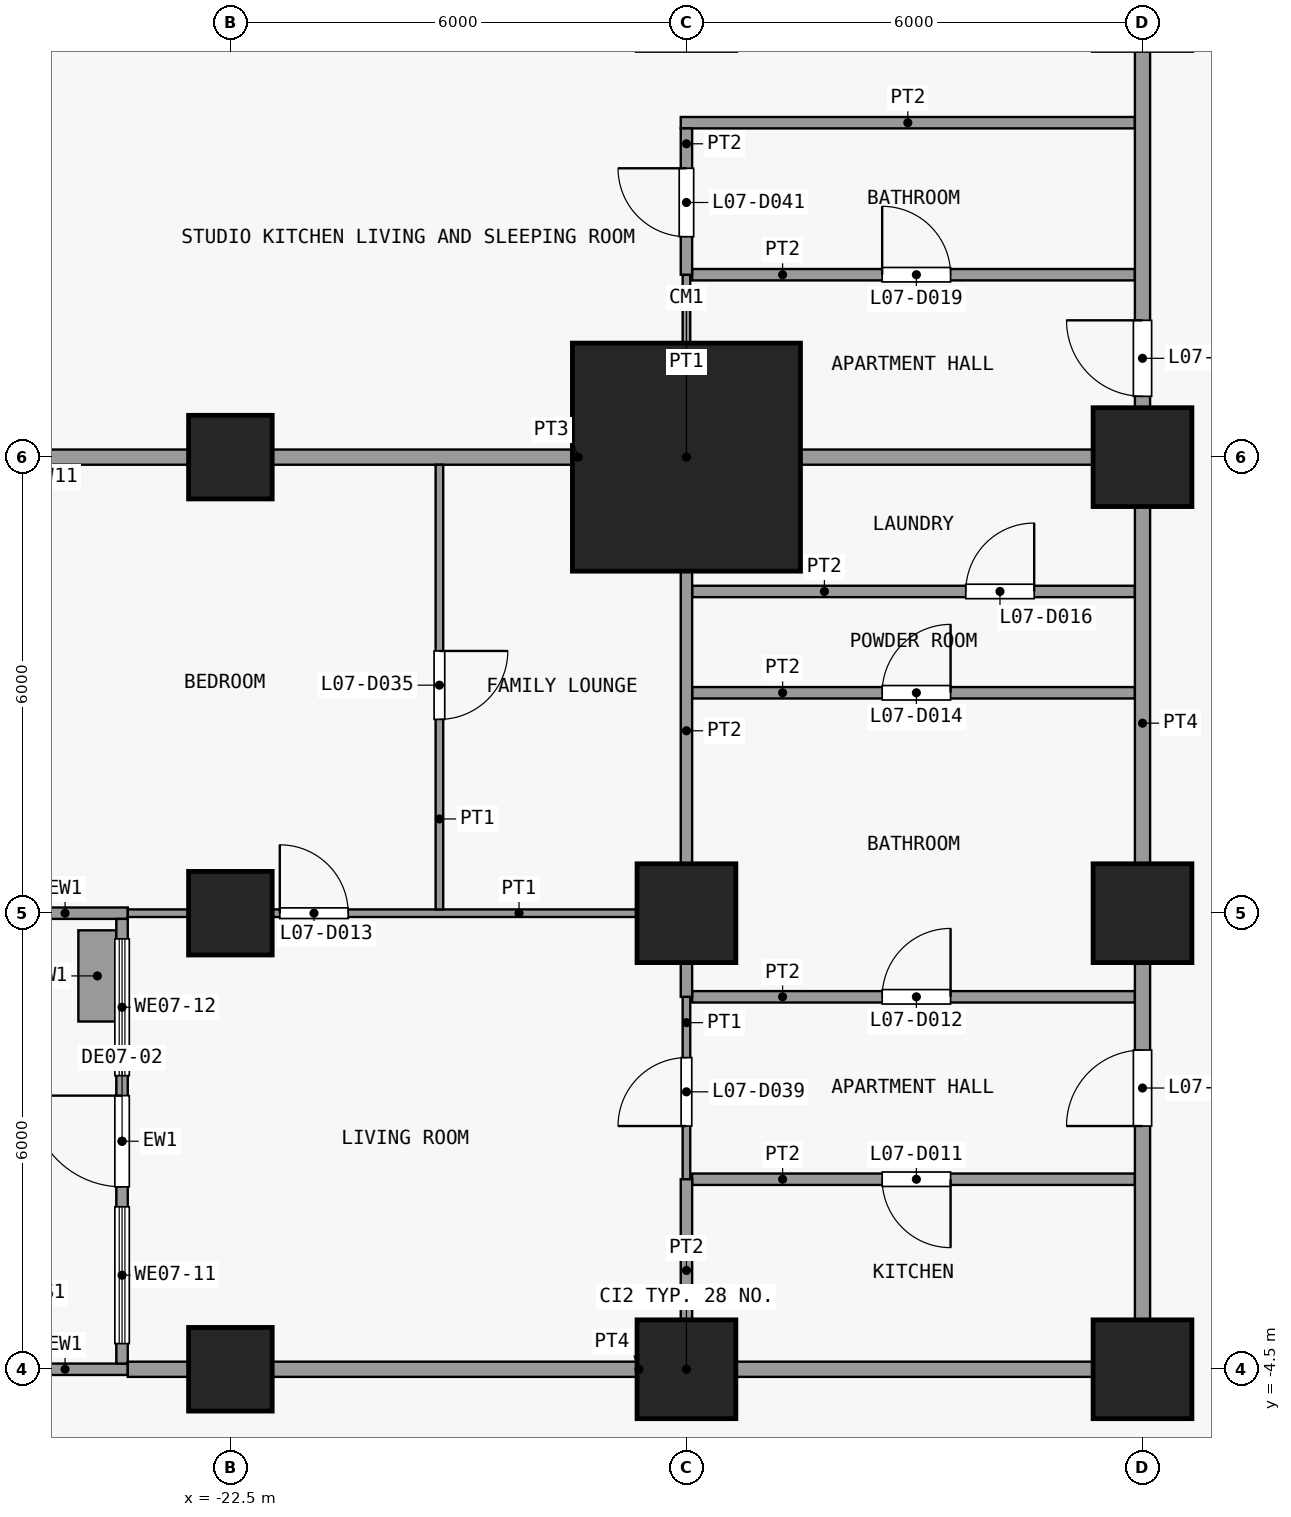
"""IFC4 building model, lengths in metres.
Left out: names, types, materials, properties, quantities, classifications, styles, units other than length and angle.
Written with IfcOpenShell. Run it as: python <this file> out.ifc"""

import sys

from ifc_helpers import new_model, si_unit, direction, frame, frame_2d, origin, origin_2d, place, context, subcontext, project, spatial, rectangle, extrude, element, fill, save


model = new_model("IFC4")
c1 = context("Model", 3, precision=1e-05, world=origin(), true_north=direction((0.0, 1.0)))
c2 = subcontext(c1, "Body", "Model", "MODEL_VIEW")
j1 = project(units=[si_unit("LENGTHUNIT", "METRE"), si_unit("PLANEANGLEUNIT", "RADIAN")], contexts=[c1])
p1 = place(None, origin())
s1 = spatial("IfcSite", under=j1, at=p1, CompositionType="ELEMENT")
p2 = place(p1, origin())
s2 = spatial("IfcBuilding", under=s1, at=p2, CompositionType="ELEMENT")
p3 = place(p2, frame((0.0, 0.0, 36.1)))
s3 = spatial("IfcBuildingStorey", under=s2, at=p3, CompositionType="ELEMENT", Elevation=36.1)
for number, where, z_axis, x_axis in (
    (1, (-22.5, -4.5, 0.0), (0.0, 0.0, 1.0), (1.0, 0.0, 0.0)),
    (2, (-22.5, 1.5, 0.0), (0.0, 0.0, 1.0), (1.0, 0.0, 0.0)),
    (3, (-22.5, 7.5, 0.0), (0.0, 0.0, 1.0), (1.0, 0.0, 0.0)),
):
    element("IfcColumn", number, at=place(p3, frame(where, z_axis=z_axis, x_axis=x_axis)), inside=s3, PredefinedType="COLUMN", context=c2, shape_type="SweptSolid", body=[
        extrude(rectangle(XDim=1.1, YDim=1.1, at=origin_2d()), origin(), (0.0, 0.0, 1.0), 3.6),
    ])
for number, where, z_axis, x_axis in (
    (4, (-16.5, -4.5, 0.0), (0.0, 0.0, 1.0), (1.0, 0.0, 0.0)),
    (5, (-16.5, 1.5, 0.0), (0.0, 0.0, 1.0), (1.0, 0.0, 0.0)),
):
    element("IfcColumn", number, at=place(p3, frame(where, z_axis=z_axis, x_axis=x_axis)), inside=s3, PredefinedType="COLUMN", context=c2, shape_type="SweptSolid", body=[
        extrude(rectangle(XDim=1.3, YDim=1.3, at=origin_2d()), origin(), (0.0, 0.0, 1.0), 3.6),
    ])
p4 = place(p3, frame((-16.5, 7.5, 0.0), z_axis=(0.0, 0.0, 1.0), x_axis=(1.0, 0.0, 0.0)))
e6 = element("IfcColumn", 6, at=p4, inside=s3, PredefinedType="COLUMN", context=c2, shape_type="SweptSolid", body=[
    extrude(rectangle(XDim=3.0, YDim=3.0, at=origin_2d()), origin(), (0.0, 0.0, 1.0), 3.6),
])
for number, where, z_axis, x_axis in (
    (7, (-10.5, -4.5, 0.0), (0.0, 0.0, 1.0), (1.0, 0.0, 0.0)),
    (8, (-10.5, 1.5, 0.0), (0.0, 0.0, 1.0), (1.0, 0.0, 0.0)),
    (9, (-10.5, 7.5, 0.0), (0.0, 0.0, 1.0), (1.0, 0.0, 0.0)),
):
    element("IfcColumn", number, at=place(p3, frame(where, z_axis=z_axis, x_axis=x_axis)), inside=s3, PredefinedType="COLUMN", context=c2, shape_type="SweptSolid", body=[
        extrude(rectangle(XDim=1.3, YDim=1.3, at=origin_2d()), origin(), (0.0, 0.0, 1.0), 3.6),
    ])
for number, where, z_axis, x_axis in (
    (10, (-23.85, -4.5, 0.0), (0.0, 0.0, 1.0), (-1.0, 0.0, 0.0)),
    (11, (-23.85, 1.5, 0.0), (0.0, 0.0, 1.0), (-1.0, 0.0, 0.0)),
):
    element("IfcWall", number, at=place(p3, frame(where, z_axis=z_axis, x_axis=x_axis)), inside=s3, PredefinedType="SOLIDWALL", context=c2, shape_type="SweptSolid", body=[
        extrude(rectangle(XDim=1.65, YDim=0.15, at=frame_2d((0.825, 0.0))), origin(), (0.0, 0.0, 1.0), 3.3),
    ])
p5 = place(p3, frame((-23.925, -4.425, 0.0), z_axis=(0.0, 0.0, 1.0), x_axis=(0.0, 1.0, 0.0)))
e12 = element("IfcWall", 12, at=p5, inside=s3, PredefinedType="SOLIDWALL", context=c2, shape_type="SweptSolid", body=[
    extrude(rectangle(XDim=5.85, YDim=0.15, at=frame_2d((2.925, 0.0))), origin(), (0.0, 0.0, 1.0), 3.3),
])
p6 = place(p5, frame((2.325, 0.0, 0.0)))
e13 = element("IfcOpeningElement", 13, at=p6, cuts=e12, PredefinedType="OPENING", context=c2, shape_type="SweptSolid", body=[
    extrude(rectangle(XDim=1.2, YDim=2.4, at=frame_2d((0.6, 1.2))), frame((0.0, 0.085, 0.0), z_axis=(0.0, -1.0, 0.0), x_axis=(1.0, 0.0, 0.0)), (0.0, 0.0, 1.0), 0.17),
])
p7 = place(p5, frame((0.262, 0.0, 0.9)))
e14 = element("IfcOpeningElement", 14, at=p7, cuts=e12, PredefinedType="OPENING", context=c2, shape_type="SweptSolid", body=[
    extrude(rectangle(XDim=1.8, YDim=2.1, at=frame_2d((0.9, 1.05))), frame((0.0, 0.085, 0.0), z_axis=(0.0, -1.0, 0.0), x_axis=(1.0, 0.0, 0.0)), (0.0, 0.0, 1.0), 0.17),
])
p8 = place(p5, frame((3.788, 0.0, 0.9)))
e15 = element("IfcOpeningElement", 15, at=p8, cuts=e12, PredefinedType="OPENING", context=c2, shape_type="SweptSolid", body=[
    extrude(rectangle(XDim=1.8, YDim=2.1, at=frame_2d((0.9, 1.05))), frame((0.0, 0.085, 0.0), z_axis=(0.0, -1.0, 0.0), x_axis=(1.0, 0.0, 0.0)), (0.0, 0.0, 1.0), 0.17),
])
p9 = place(p3, frame((-24.25, 0.075, 0.0), z_axis=(0.0, 0.0, 1.0), x_axis=(0.0, 1.0, 0.0)))
e16 = element("IfcWall", 16, at=p9, inside=s3, PredefinedType="USERDEFINED", context=c2, shape_type="SweptSolid", body=[
    extrude(rectangle(XDim=1.2, YDim=0.5, at=frame_2d((0.6, 0.0))), origin(), (0.0, 0.0, 1.0), 0.9),
])
p10 = place(p3, frame((-23.85, -4.5, 0.0), z_axis=(0.0, 0.0, 1.0), x_axis=(1.0, 0.0, 0.0)))
e17 = element("IfcWall", 17, at=p10, inside=s3, PredefinedType="PARTITIONING", context=c2, shape_type="SweptSolid", body=[
    extrude(rectangle(XDim=13.45, YDim=0.2, at=frame_2d((6.725, 0.0))), origin(), (0.0, 0.0, 1.0), 3.3),
])
p11 = place(p3, frame((-16.425, -2.0, 0.0), z_axis=(0.0, 0.0, 1.0), x_axis=(1.0, 0.0, 0.0)))
e18 = element("IfcWall", 18, at=p11, inside=s3, PredefinedType="PARTITIONING", context=c2, shape_type="SweptSolid", body=[
    extrude(rectangle(XDim=5.825, YDim=0.15, at=frame_2d((2.913, 0.0))), origin(), (0.0, 0.0, 1.0), 3.3),
])
p12 = place(p11, frame((2.5, 0.0, 0.0)))
e19 = element("IfcOpeningElement", 19, at=p12, cuts=e18, PredefinedType="OPENING", context=c2, shape_type="SweptSolid", body=[
    extrude(rectangle(XDim=0.9, YDim=2.1, at=frame_2d((0.45, 1.05))), frame((0.0, 0.085, 0.0), z_axis=(0.0, -1.0, 0.0), x_axis=(1.0, 0.0, 0.0)), (0.0, 0.0, 1.0), 0.17),
])
p13 = place(p3, frame((-16.425, 0.4, 0.0), z_axis=(0.0, 0.0, 1.0), x_axis=(1.0, 0.0, 0.0)))
e20 = element("IfcWall", 20, at=p13, inside=s3, PredefinedType="PARTITIONING", context=c2, shape_type="SweptSolid", body=[
    extrude(rectangle(XDim=5.825, YDim=0.15, at=frame_2d((2.913, 0.0))), origin(), (0.0, 0.0, 1.0), 3.3),
])
p14 = place(p13, frame((2.5, 0.0, 0.0)))
e21 = element("IfcOpeningElement", 21, at=p14, cuts=e20, PredefinedType="OPENING", context=c2, shape_type="SweptSolid", body=[
    extrude(rectangle(XDim=0.9, YDim=2.1, at=frame_2d((0.45, 1.05))), frame((0.0, 0.085, 0.0), z_axis=(0.0, -1.0, 0.0), x_axis=(1.0, 0.0, 0.0)), (0.0, 0.0, 1.0), 0.17),
])
p15 = place(p3, frame((-23.85, 1.5, 0.0), z_axis=(0.0, 0.0, 1.0), x_axis=(1.0, 0.0, 0.0)))
e22 = element("IfcWall", 22, at=p15, inside=s3, PredefinedType="PARTITIONING", context=c2, shape_type="SweptSolid", body=[
    extrude(rectangle(XDim=7.275, YDim=0.1, at=frame_2d((3.638, 0.0))), origin(), (0.0, 0.0, 1.0), 3.3),
])
p16 = place(p15, frame((2.0, 0.0, 0.0)))
e23 = element("IfcOpeningElement", 23, at=p16, cuts=e22, PredefinedType="OPENING", context=c2, shape_type="SweptSolid", body=[
    extrude(rectangle(XDim=0.9, YDim=2.1, at=frame_2d((0.45, 1.05))), frame((0.0, 0.06, 0.0), z_axis=(0.0, -1.0, 0.0), x_axis=(1.0, 0.0, 0.0)), (0.0, 0.0, 1.0), 0.12),
])
p17 = place(p3, frame((-16.425, 4.4, 0.0), z_axis=(0.0, 0.0, 1.0), x_axis=(1.0, 0.0, 0.0)))
e24 = element("IfcWall", 24, at=p17, inside=s3, PredefinedType="PARTITIONING", context=c2, shape_type="SweptSolid", body=[
    extrude(rectangle(XDim=5.825, YDim=0.15, at=frame_2d((2.913, 0.0))), origin(), (0.0, 0.0, 1.0), 3.3),
])
p18 = place(p17, frame((2.5, 0.0, 0.0)))
e25 = element("IfcOpeningElement", 25, at=p18, cuts=e24, PredefinedType="OPENING", context=c2, shape_type="SweptSolid", body=[
    extrude(rectangle(XDim=0.9, YDim=2.1, at=frame_2d((0.45, 1.05))), frame((0.0, 0.085, 0.0), z_axis=(0.0, -1.0, 0.0), x_axis=(1.0, 0.0, 0.0)), (0.0, 0.0, 1.0), 0.17),
])
p19 = place(p3, frame((-16.425, 5.733, 0.0), z_axis=(0.0, 0.0, 1.0), x_axis=(1.0, 0.0, 0.0)))
e26 = element("IfcWall", 26, at=p19, inside=s3, PredefinedType="PARTITIONING", context=c2, shape_type="SweptSolid", body=[
    extrude(rectangle(XDim=5.825, YDim=0.15, at=frame_2d((2.913, 0.0))), origin(), (0.0, 0.0, 1.0), 3.3),
])
p20 = place(p19, frame((3.6, 0.0, 0.0)))
e27 = element("IfcOpeningElement", 27, at=p20, cuts=e26, PredefinedType="OPENING", context=c2, shape_type="SweptSolid", body=[
    extrude(rectangle(XDim=0.9, YDim=2.1, at=frame_2d((0.45, 1.05))), frame((0.0, 0.085, 0.0), z_axis=(0.0, -1.0, 0.0), x_axis=(1.0, 0.0, 0.0)), (0.0, 0.0, 1.0), 0.17),
])
p21 = place(p3, frame((-25.25, 7.5, 0.0), z_axis=(0.0, 0.0, 1.0), x_axis=(1.0, 0.0, 0.0)))
e28 = element("IfcWall", 28, at=p21, inside=s3, PredefinedType="PARTITIONING", context=c2, shape_type="SweptSolid", body=[
    extrude(rectangle(XDim=14.65, YDim=0.2, at=frame_2d((7.325, 0.0))), origin(), (0.0, 0.0, 1.0), 3.3),
])
p22 = place(p3, frame((-16.425, 9.9, 0.0), z_axis=(0.0, 0.0, 1.0), x_axis=(1.0, 0.0, 0.0)))
e29 = element("IfcWall", 29, at=p22, inside=s3, PredefinedType="PARTITIONING", context=c2, shape_type="SweptSolid", body=[
    extrude(rectangle(XDim=5.825, YDim=0.15, at=frame_2d((2.913, 0.0))), origin(), (0.0, 0.0, 1.0), 3.3),
])
p23 = place(p22, frame((2.5, 0.0, 0.0)))
e30 = element("IfcOpeningElement", 30, at=p23, cuts=e29, PredefinedType="OPENING", context=c2, shape_type="SweptSolid", body=[
    extrude(rectangle(XDim=0.9, YDim=2.1, at=frame_2d((0.45, 1.05))), frame((0.0, 0.085, 0.0), z_axis=(0.0, -1.0, 0.0), x_axis=(1.0, 0.0, 0.0)), (0.0, 0.0, 1.0), 0.17),
])
p24 = place(p3, frame((-16.575, 11.9, 0.0), z_axis=(0.0, 0.0, 1.0), x_axis=(1.0, 0.0, 0.0)))
e31 = element("IfcWall", 31, at=p24, inside=s3, PredefinedType="PARTITIONING", context=c2, shape_type="SweptSolid", body=[
    extrude(rectangle(XDim=5.975, YDim=0.15, at=frame_2d((2.987, 0.0))), origin(), (0.0, 0.0, 1.0), 3.3),
])
p25 = place(p3, frame((-19.75, 1.55, 0.0), z_axis=(0.0, 0.0, 1.0), x_axis=(0.0, 1.0, 0.0)))
e32 = element("IfcWall", 32, at=p25, inside=s3, PredefinedType="PARTITIONING", context=c2, shape_type="SweptSolid", body=[
    extrude(rectangle(XDim=5.85, YDim=0.1, at=frame_2d((2.925, 0.0))), origin(), (0.0, 0.0, 1.0), 3.3),
])
p26 = place(p25, frame((2.5, 0.0, 0.0)))
e33 = element("IfcOpeningElement", 33, at=p26, cuts=e32, PredefinedType="OPENING", context=c2, shape_type="SweptSolid", body=[
    extrude(rectangle(XDim=0.9, YDim=2.1, at=frame_2d((0.45, 1.05))), frame((0.0, 0.06, 0.0), z_axis=(0.0, -1.0, 0.0), x_axis=(1.0, 0.0, 0.0)), (0.0, 0.0, 1.0), 0.12),
])
p27 = place(p3, frame((-16.5, -2.0, 0.0), z_axis=(0.0, 0.0, 1.0), x_axis=(0.0, 1.0, 0.0)))
e34 = element("IfcWall", 34, at=p27, inside=s3, PredefinedType="PARTITIONING", context=c2, shape_type="SweptSolid", body=[
    extrude(rectangle(XDim=2.4, YDim=0.1, at=frame_2d((1.2, 0.0))), origin(), (0.0, 0.0, 1.0), 3.3),
])
p28 = place(p27, frame((0.7, 0.0, 0.0)))
e35 = element("IfcOpeningElement", 35, at=p28, cuts=e34, PredefinedType="OPENING", context=c2, shape_type="SweptSolid", body=[
    extrude(rectangle(XDim=0.9, YDim=2.1, at=frame_2d((0.45, 1.05))), frame((0.0, 0.06, 0.0), z_axis=(0.0, -1.0, 0.0), x_axis=(1.0, 0.0, 0.0)), (0.0, 0.0, 1.0), 0.12),
])
p29 = place(p3, frame((-16.5, 7.6, 0.0), z_axis=(0.0, 0.0, 1.0), x_axis=(0.0, 1.0, 0.0)))
e36 = element("IfcWall", 36, at=p29, inside=s3, PredefinedType="PARTITIONING", context=c2, shape_type="SweptSolid", body=[
    extrude(rectangle(XDim=2.3, YDim=0.1, at=frame_2d((1.15, 0.0))), origin(), (0.0, 0.0, 1.0), 3.3),
])
p30 = place(p3, frame((-16.5, -4.4, 0.0), z_axis=(0.0, 0.0, 1.0), x_axis=(0.0, 1.0, 0.0)))
e37 = element("IfcWall", 37, at=p30, inside=s3, PredefinedType="PARTITIONING", context=c2, shape_type="SweptSolid", body=[
    extrude(rectangle(XDim=2.4, YDim=0.15, at=frame_2d((1.2, 0.0))), origin(), (0.0, 0.0, 1.0), 3.3),
])
p31 = place(p3, frame((-16.5, 0.4, 0.0), z_axis=(0.0, 0.0, 1.0), x_axis=(0.0, 1.0, 0.0)))
e38 = element("IfcWall", 38, at=p31, inside=s3, PredefinedType="PARTITIONING", context=c2, shape_type="SweptSolid", body=[
    extrude(rectangle(XDim=7.0, YDim=0.15, at=frame_2d((3.5, 0.0))), origin(), (0.0, 0.0, 1.0), 3.3),
])
p32 = place(p3, frame((-16.5, 9.9, 0.0), z_axis=(0.0, 0.0, 1.0), x_axis=(0.0, 1.0, 0.0)))
e39 = element("IfcWall", 39, at=p32, inside=s3, PredefinedType="PARTITIONING", context=c2, shape_type="SweptSolid", body=[
    extrude(rectangle(XDim=1.925, YDim=0.15, at=frame_2d((0.962, 0.0))), origin(), (0.0, 0.0, 1.0), 3.3),
])
p33 = place(p32, frame((0.5, 0.0, 0.0)))
e40 = element("IfcOpeningElement", 40, at=p33, cuts=e39, PredefinedType="OPENING", context=c2, shape_type="SweptSolid", body=[
    extrude(rectangle(XDim=0.9, YDim=2.1, at=frame_2d((0.45, 1.05))), frame((0.0, 0.085, 0.0), z_axis=(0.0, -1.0, 0.0), x_axis=(1.0, 0.0, 0.0)), (0.0, 0.0, 1.0), 0.17),
])
p34 = place(p3, frame((-10.5, -4.4, 0.0), z_axis=(0.0, 0.0, 1.0), x_axis=(0.0, 1.0, 0.0)))
e41 = element("IfcWall", 41, at=p34, inside=s3, PredefinedType="PARTITIONING", context=c2, shape_type="SweptSolid", body=[
    extrude(rectangle(XDim=17.8, YDim=0.2, at=frame_2d((8.9, 0.0))), origin(), (0.0, 0.0, 1.0), 3.3),
])
p35 = place(p34, frame((3.1, 0.0, 0.0)))
e42 = element("IfcOpeningElement", 42, at=p35, cuts=e41, PredefinedType="OPENING", context=c2, shape_type="SweptSolid", body=[
    extrude(rectangle(XDim=1.0, YDim=2.1, at=frame_2d((0.5, 1.05))), frame((0.0, 0.11, 0.0), z_axis=(0.0, -1.0, 0.0), x_axis=(1.0, 0.0, 0.0)), (0.0, 0.0, 1.0), 0.22),
])
p36 = place(p34, frame((12.7, 0.0, 0.0)))
e43 = element("IfcOpeningElement", 43, at=p36, cuts=e41, PredefinedType="OPENING", context=c2, shape_type="SweptSolid", body=[
    extrude(rectangle(XDim=1.0, YDim=2.1, at=frame_2d((0.5, 1.05))), frame((0.0, 0.11, 0.0), z_axis=(0.0, -1.0, 0.0), x_axis=(1.0, 0.0, 0.0)), (0.0, 0.0, 1.0), 0.22),
])
p37 = place(p6, origin())
e44 = element("IfcDoor", 44, at=p37, inside=s3, OperationType="SINGLE_SWING_RIGHT", PredefinedType="DOOR", context=c2, shape_type="SweptSolid", body=[
    extrude(rectangle(XDim=1.2, YDim=2.4, at=frame_2d((0.6, 1.2))), frame((0.0, 0.025, 0.0), z_axis=(0.0, -1.0, 0.0), x_axis=(1.0, 0.0, 0.0)), (0.0, 0.0, 1.0), 0.05),
])
fill(e13, e44)
p38 = place(p7, origin())
e45 = element("IfcWindow", 45, at=p38, inside=s3, PartitioningType="SINGLE_PANEL", PredefinedType="WINDOW", context=c2, shape_type="SweptSolid", body=[
    extrude(rectangle(XDim=1.8, YDim=2.1, at=frame_2d((0.9, 1.05))), frame((0.0, 0.03, 0.0), z_axis=(0.0, -1.0, 0.0), x_axis=(1.0, 0.0, 0.0)), (0.0, 0.0, 1.0), 0.06),
])
fill(e14, e45)
p39 = place(p8, origin())
e46 = element("IfcWindow", 46, at=p39, inside=s3, PartitioningType="SINGLE_PANEL", PredefinedType="WINDOW", context=c2, shape_type="SweptSolid", body=[
    extrude(rectangle(XDim=1.8, YDim=2.1, at=frame_2d((0.9, 1.05))), frame((0.0, 0.03, 0.0), z_axis=(0.0, -1.0, 0.0), x_axis=(1.0, 0.0, 0.0)), (0.0, 0.0, 1.0), 0.06),
])
fill(e15, e46)
p40 = place(p12, origin())
e47 = element("IfcDoor", 47, at=p40, inside=s3, OperationType="SINGLE_SWING_RIGHT", PredefinedType="DOOR", context=c2, shape_type="SweptSolid", body=[
    extrude(rectangle(XDim=0.9, YDim=2.1, at=frame_2d((0.45, 1.05))), frame((0.0, 0.025, 0.0), z_axis=(0.0, -1.0, 0.0), x_axis=(1.0, 0.0, 0.0)), (0.0, 0.0, 1.0), 0.05),
])
fill(e19, e47)
p41 = place(p14, origin())
e48 = element("IfcDoor", 48, at=p41, inside=s3, OperationType="SINGLE_SWING_LEFT", PredefinedType="DOOR", context=c2, shape_type="SweptSolid", body=[
    extrude(rectangle(XDim=0.9, YDim=2.1, at=frame_2d((0.45, 1.05))), frame((0.0, 0.025, 0.0), z_axis=(0.0, -1.0, 0.0), x_axis=(1.0, 0.0, 0.0)), (0.0, 0.0, 1.0), 0.05),
])
fill(e21, e48)
p42 = place(p16, origin())
e49 = element("IfcDoor", 49, at=p42, inside=s3, OperationType="SINGLE_SWING_RIGHT", PredefinedType="DOOR", context=c2, shape_type="SweptSolid", body=[
    extrude(rectangle(XDim=0.9, YDim=2.1, at=frame_2d((0.45, 1.05))), frame((0.0, 0.025, 0.0), z_axis=(0.0, -1.0, 0.0), x_axis=(1.0, 0.0, 0.0)), (0.0, 0.0, 1.0), 0.05),
])
fill(e23, e49)
p43 = place(p18, origin())
e50 = element("IfcDoor", 50, at=p43, inside=s3, OperationType="SINGLE_SWING_LEFT", PredefinedType="DOOR", context=c2, shape_type="SweptSolid", body=[
    extrude(rectangle(XDim=0.9, YDim=2.1, at=frame_2d((0.45, 1.05))), frame((0.0, 0.025, 0.0), z_axis=(0.0, -1.0, 0.0), x_axis=(1.0, 0.0, 0.0)), (0.0, 0.0, 1.0), 0.05),
])
fill(e25, e50)
p44 = place(p20, origin())
e51 = element("IfcDoor", 51, at=p44, inside=s3, OperationType="SINGLE_SWING_LEFT", PredefinedType="DOOR", context=c2, shape_type="SweptSolid", body=[
    extrude(rectangle(XDim=0.9, YDim=2.1, at=frame_2d((0.45, 1.05))), frame((0.0, 0.025, 0.0), z_axis=(0.0, -1.0, 0.0), x_axis=(1.0, 0.0, 0.0)), (0.0, 0.0, 1.0), 0.05),
])
fill(e27, e51)
p45 = place(p23, origin())
e52 = element("IfcDoor", 52, at=p45, inside=s3, OperationType="SINGLE_SWING_RIGHT", PredefinedType="DOOR", context=c2, shape_type="SweptSolid", body=[
    extrude(rectangle(XDim=0.9, YDim=2.1, at=frame_2d((0.45, 1.05))), frame((0.0, 0.025, 0.0), z_axis=(0.0, -1.0, 0.0), x_axis=(1.0, 0.0, 0.0)), (0.0, 0.0, 1.0), 0.05),
])
fill(e30, e52)
p46 = place(p26, origin())
e53 = element("IfcDoor", 53, at=p46, inside=s3, OperationType="SINGLE_SWING_RIGHT", PredefinedType="DOOR", context=c2, shape_type="SweptSolid", body=[
    extrude(rectangle(XDim=0.9, YDim=2.1, at=frame_2d((0.45, 1.05))), frame((0.0, 0.025, 0.0), z_axis=(0.0, -1.0, 0.0), x_axis=(1.0, 0.0, 0.0)), (0.0, 0.0, 1.0), 0.05),
])
fill(e33, e53)
p47 = place(p28, origin())
e54 = element("IfcDoor", 54, at=p47, inside=s3, OperationType="SINGLE_SWING_RIGHT", PredefinedType="DOOR", context=c2, shape_type="SweptSolid", body=[
    extrude(rectangle(XDim=0.9, YDim=2.1, at=frame_2d((0.45, 1.05))), frame((0.0, 0.025, 0.0), z_axis=(0.0, -1.0, 0.0), x_axis=(1.0, 0.0, 0.0)), (0.0, 0.0, 1.0), 0.05),
])
fill(e35, e54)
p48 = place(p33, origin())
e55 = element("IfcDoor", 55, at=p48, inside=s3, OperationType="SINGLE_SWING_LEFT", PredefinedType="DOOR", context=c2, shape_type="SweptSolid", body=[
    extrude(rectangle(XDim=0.9, YDim=2.1, at=frame_2d((0.45, 1.05))), frame((0.0, 0.025, 0.0), z_axis=(0.0, -1.0, 0.0), x_axis=(1.0, 0.0, 0.0)), (0.0, 0.0, 1.0), 0.05),
])
fill(e40, e55)
p49 = place(p35, origin())
e56 = element("IfcDoor", 56, at=p49, inside=s3, OperationType="SINGLE_SWING_RIGHT", PredefinedType="DOOR", context=c2, shape_type="SweptSolid", body=[
    extrude(rectangle(XDim=1.0, YDim=2.1, at=frame_2d((0.5, 1.05))), frame((0.0, 0.025, 0.0), z_axis=(0.0, -1.0, 0.0), x_axis=(1.0, 0.0, 0.0)), (0.0, 0.0, 1.0), 0.05),
])
fill(e42, e56)
p50 = place(p36, origin())
e57 = element("IfcDoor", 57, at=p50, inside=s3, OperationType="SINGLE_SWING_LEFT", PredefinedType="DOOR", context=c2, shape_type="SweptSolid", body=[
    extrude(rectangle(XDim=1.0, YDim=2.1, at=frame_2d((0.5, 1.05))), frame((0.0, 0.025, 0.0), z_axis=(0.0, -1.0, 0.0), x_axis=(1.0, 0.0, 0.0)), (0.0, 0.0, 1.0), 0.05),
])
fill(e43, e57)
save(model, sys.argv[1])
